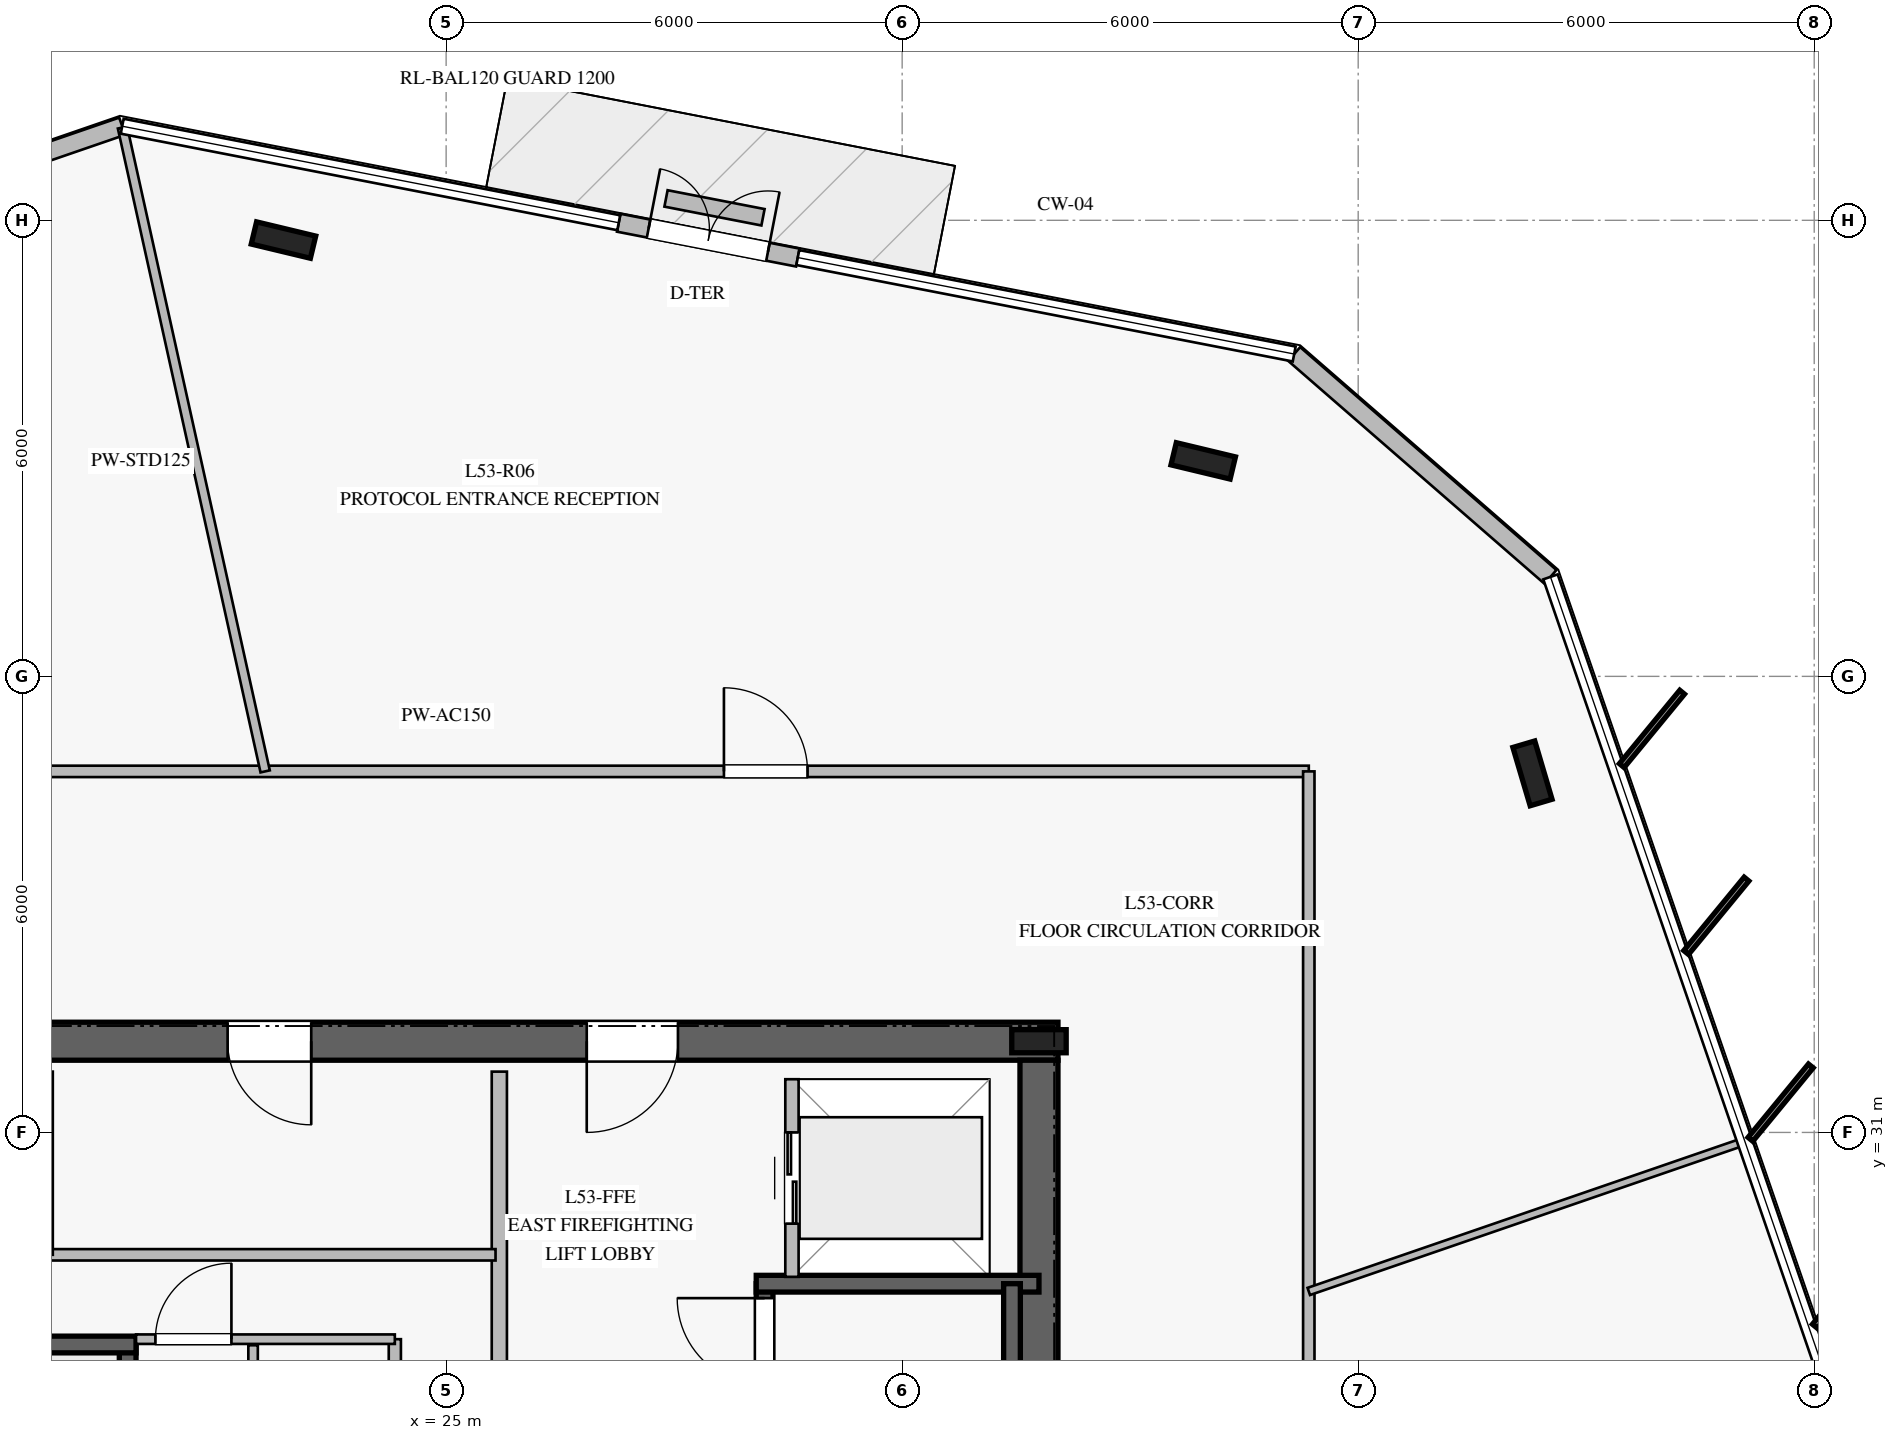
"""IFC4 building model, lengths in metres.
Left out: names, types, materials, properties, quantities, classifications, styles, units other than length and angle.
Written with IfcOpenShell. Run it as: python <this file> out.ifc"""

import sys

from ifc_helpers import new_model, si_unit, direction, frame, frame_2d, origin, origin_2d, place, context, subcontext, project, spatial, rectangle, i_section, extrude, element, fill, save


model = new_model("IFC4")
c1 = context("Model", 3, precision=1e-05, world=origin(), true_north=direction((0.0, 1.0)))
c2 = subcontext(c1, "Body", "Model", "MODEL_VIEW")
j1 = project(units=[si_unit("LENGTHUNIT", "METRE"), si_unit("PLANEANGLEUNIT", "RADIAN")], contexts=[c1])
p1 = place(None, origin())
s1 = spatial("IfcSite", under=j1, at=p1, CompositionType="ELEMENT")
p2 = place(p1, origin())
s2 = spatial("IfcBuilding", under=s1, at=p2, CompositionType="ELEMENT")
p3 = place(p2, frame((0.0, 0.0, 220.8)))
s3 = spatial("IfcBuildingStorey", under=s2, at=p3, CompositionType="ELEMENT", Elevation=220.8)
p4 = place(p3, frame((33.05, 32.2, 0.0), z_axis=(0.0, 0.0, 1.0), x_axis=(-1.0, 0.0, 0.0)))
e1 = element("IfcWall", 1, at=p4, inside=s3, PredefinedType="SHEAR", context=c2, shape_type="SweptSolid", body=[
    extrude(rectangle(XDim=16.1, YDim=0.5, at=frame_2d((8.05, 0.0))), origin(), (0.0, 0.0, 1.0), 3.78),
])
p5 = place(p4, frame((5.0, 0.0, 0.0)))
e2 = element("IfcOpeningElement", 2, at=p5, cuts=e1, PredefinedType="OPENING", context=c2, shape_type="SweptSolid", body=[
    extrude(rectangle(XDim=1.2, YDim=2.25, at=frame_2d((0.6, 1.125))), frame((0.0, 0.26, 0.0), z_axis=(0.0, -1.0, 0.0), x_axis=(1.0, 0.0, 0.0)), (0.0, 0.0, 1.0), 0.52),
])
p6 = place(p4, frame((9.825, 0.0, 0.0)))
e3 = element("IfcOpeningElement", 3, at=p6, cuts=e1, PredefinedType="OPENING", context=c2, shape_type="SweptSolid", body=[
    extrude(rectangle(XDim=1.1, YDim=2.2, at=frame_2d((0.55, 1.1))), frame((0.0, 0.26, 0.0), z_axis=(0.0, -1.0, 0.0), x_axis=(1.0, 0.0, 0.0)), (0.0, 0.0, 1.0), 0.52),
])
p7 = place(p3, frame((32.8, 18.05, 0.0), z_axis=(0.0, 0.0, 1.0), x_axis=(0.0, 1.0, 0.0)))
e4 = element("IfcWall", 4, at=p7, inside=s3, PredefinedType="SHEAR", context=c2, shape_type="SweptSolid", body=[
    extrude(rectangle(XDim=13.9, YDim=0.5, at=frame_2d((6.95, 0.0))), origin(), (0.0, 0.0, 1.0), 3.78),
])
p8 = place(p3, frame((32.8, 32.2, 0.0), z_axis=(0.0, 0.0, 1.0), x_axis=(1.0, 0.0, 0.0)))
e5 = element("IfcColumn", 5, at=p8, inside=s3, PredefinedType="COLUMN", context=c2, shape_type="SweptSolid", body=[
    extrude(i_section(OverallWidth=0.304, OverallDepth=0.716, WebThickness=0.021, FlangeThickness=0.04, at=origin_2d()), origin(), (0.0, 0.0, 1.0), 4.0),
])
p9 = place(p3, frame((20.81, 20.99, 0.0), z_axis=(0.0, 0.0, 1.0), x_axis=(0.0, 1.0, 0.0)))
e6 = element("IfcWall", 6, at=p9, inside=s3, PredefinedType="SOLIDWALL", context=c2, shape_type="SweptSolid", body=[
    extrude(rectangle(XDim=7.22, YDim=0.22, at=frame_2d((3.61, 0.0))), origin(), (0.0, 0.0, 1.0), 3.78),
])
p10 = place(p9, frame((0.18, 0.0, 0.0)))
e7 = element("IfcOpeningElement", 7, at=p10, cuts=e6, PredefinedType="OPENING", context=c2, shape_type="SweptSolid", body=[
    extrude(rectangle(XDim=1.15, YDim=2.2, at=frame_2d((0.575, 1.1))), frame((0.0, 0.12, 0.0), z_axis=(0.0, -1.0, 0.0), x_axis=(1.0, 0.0, 0.0)), (0.0, 0.0, 1.0), 0.24),
])
p11 = place(p3, frame((17.2, 28.21, 0.0), z_axis=(0.0, 0.0, 1.0), x_axis=(1.0, 0.0, 0.0)))
e8 = element("IfcWall", 8, at=p11, inside=s3, PredefinedType="SOLIDWALL", context=c2, shape_type="SweptSolid", body=[
    extrude(rectangle(XDim=3.72, YDim=0.22, at=frame_2d((1.86, 0.0))), origin(), (0.0, 0.0, 1.0), 3.78),
])
p12 = place(p3, frame((29.19, 21.79, 0.0), z_axis=(0.0, 0.0, 1.0), x_axis=(0.0, 1.0, 0.0)))
e9 = element("IfcWall", 9, at=p12, inside=s3, PredefinedType="SOLIDWALL", context=c2, shape_type="SweptSolid", body=[
    extrude(rectangle(XDim=7.22, YDim=0.22, at=frame_2d((3.61, 0.0))), origin(), (0.0, 0.0, 1.0), 3.78),
])
p13 = place(p12, frame((5.88, 0.0, 0.0)))
e10 = element("IfcOpeningElement", 10, at=p13, cuts=e9, PredefinedType="OPENING", context=c2, shape_type="SweptSolid", body=[
    extrude(rectangle(XDim=1.15, YDim=2.2, at=frame_2d((0.575, 1.1))), frame((0.0, 0.12, 0.0), z_axis=(0.0, -1.0, 0.0), x_axis=(1.0, 0.0, 0.0)), (0.0, 0.0, 1.0), 0.24),
])
p14 = place(p3, frame((29.08, 29.01, 0.0), z_axis=(0.0, 0.0, 1.0), x_axis=(1.0, 0.0, 0.0)))
e11 = element("IfcWall", 11, at=p14, inside=s3, PredefinedType="SOLIDWALL", context=c2, shape_type="SweptSolid", body=[
    extrude(rectangle(XDim=3.72, YDim=0.22, at=frame_2d((1.86, 0.0))), origin(), (0.0, 0.0, 1.0), 3.78),
])
p15 = place(p3, frame((32.445, 29.01, 0.0), z_axis=(0.0, 0.0, 1.0), x_axis=(0.0, -1.0, 0.0)))
e12 = element("IfcWall", 12, at=p15, inside=s3, PredefinedType="SOLIDWALL", context=c2, shape_type="SweptSolid", body=[
    extrude(rectangle(XDim=7.22, YDim=0.22, at=frame_2d((3.61, 0.0))), origin(), (0.0, 0.0, 1.0), 3.78),
])
for number, where, z_axis, x_axis in (
    (13, (34.961, 39.835, 0.0), (0.0, 0.0, 1.0), (-0.972, 0.233, 0.0)),
    (14, (22.86, 42.74, 0.0), (0.0, 0.0, 1.0), (-0.972, 0.233, 0.0)),
    (15, (39.293, 35.724, 0.0), (0.0, 0.0, 1.0), (-0.284, 0.959, 0.0)),
):
    element("IfcColumn", number, at=place(p3, frame(where, z_axis=z_axis, x_axis=x_axis)), inside=s3, PredefinedType="COLUMN", context=c2, shape_type="SweptSolid", body=[
        extrude(i_section(OverallWidth=0.3, OverallDepth=0.8, WebThickness=0.018, FlangeThickness=0.033, at=origin_2d()), origin(), (0.0, 0.0, 1.0), 4.0),
    ])
p16 = place(p3, frame((29.627, 42.51, 0.0), z_axis=(0.0, 0.0, 1.0), x_axis=(-0.981622800685, 0.190831541356, 0.0)))
e16 = element("IfcWall", 16, at=p16, inside=s3, PredefinedType="STANDARD", context=c2, shape_type="SweptSolid", body=[
    extrude(rectangle(XDim=2.4, YDim=0.24, at=frame_2d((1.2, 0.0))), origin(), (0.0, 0.0, 1.0), 3.78),
])
p17 = place(p16, frame((0.4, 0.0, 0.0)))
e17 = element("IfcOpeningElement", 17, at=p17, cuts=e16, PredefinedType="OPENING", context=c2, shape_type="SweptSolid", body=[
    extrude(rectangle(XDim=1.6, YDim=2.25, at=frame_2d((0.8, 1.125))), frame((0.0, 0.13, 0.0), z_axis=(0.0, -1.0, 0.0), x_axis=(1.0, 0.0, 0.0)), (0.0, 0.0, 1.0), 0.26),
])
p18 = place(p3, frame((20.738, 44.238, 0.0), z_axis=(0.0, 0.0, 1.0), x_axis=(-0.94554475493, -0.325492114227, 0.0)))
e18 = element("IfcWall", 18, at=p18, inside=s3, PredefinedType="STANDARD", context=c2, shape_type="SweptSolid", body=[
    extrude(rectangle(XDim=4.467, YDim=0.24, at=frame_2d((2.234, 0.0))), origin(), (0.0, 0.0, 1.0), 3.78),
])
p19 = place(p3, frame((39.53, 38.309, 0.0), z_axis=(0.0, 0.0, 1.0), x_axis=(-0.754644337128, 0.656134075049, 0.0)))
e19 = element("IfcWall", 19, at=p19, inside=s3, PredefinedType="STANDARD", context=c2, shape_type="SweptSolid", body=[
    extrude(rectangle(XDim=4.469, YDim=0.24, at=frame_2d((2.234, 0.0))), origin(), (0.0, 0.0, 1.0), 3.78),
])
p20 = place(p3, frame((29.169, 43.04, 0.0), z_axis=(0.0, 0.0, 1.0), x_axis=(-0.981621254658, 0.190839493826, 0.0)))
e20 = element("IfcWall", 20, at=p20, inside=s3, PredefinedType="USERDEFINED", context=c2, shape_type="SweptSolid", body=[
    extrude(rectangle(XDim=1.3, YDim=0.22, at=frame_2d((0.65, 0.0))), origin(), (0.0, 0.0, 1.0), 0.4),
])
p21 = place(p3, frame((25.7, 26.65, 0.0), z_axis=(0.0, 0.0, 1.0), x_axis=(0.0, 1.0, 0.0)))
e21 = element("IfcWall", 21, at=p21, inside=s3, PredefinedType="PARTITIONING", context=c2, shape_type="SweptSolid", body=[
    extrude(rectangle(XDim=5.15, YDim=0.2, at=frame_2d((2.575, 0.0))), origin(), (0.0, 0.0, 1.0), 3.78),
])
p22 = place(p3, frame((24.325, 23.35, 0.0), z_axis=(0.0, 0.0, 1.0), x_axis=(0.0, 1.0, 0.0)))
e22 = element("IfcWall", 22, at=p22, inside=s3, PredefinedType="PLUMBINGWALL", context=c2, shape_type="SweptSolid", body=[
    extrude(rectangle(XDim=4.93, YDim=0.16, at=frame_2d((2.465, 0.0))), origin(), (0.0, 0.0, 1.0), 3.78),
])
p23 = place(p22, frame((0.65, 0.0, 0.0)))
e23 = element("IfcOpeningElement", 23, at=p23, cuts=e22, PredefinedType="OPENING", context=c2, shape_type="SweptSolid", body=[
    extrude(rectangle(XDim=0.95, YDim=2.1, at=frame_2d((0.475, 1.05))), frame((0.0, 0.09, 0.0), z_axis=(0.0, -1.0, 0.0), x_axis=(1.0, 0.0, 0.0)), (0.0, 0.0, 1.0), 0.18),
])
p24 = place(p22, frame((3.11, 0.0, 0.0)))
e24 = element("IfcOpeningElement", 24, at=p24, cuts=e22, PredefinedType="OPENING", context=c2, shape_type="SweptSolid", body=[
    extrude(rectangle(XDim=0.9, YDim=2.1, at=frame_2d((0.45, 1.05))), frame((0.0, 0.09, 0.0), z_axis=(0.0, -1.0, 0.0), x_axis=(1.0, 0.0, 0.0)), (0.0, 0.0, 1.0), 0.18),
])
p25 = place(p3, frame((20.92, 28.28, 0.0), z_axis=(0.0, 0.0, 1.0), x_axis=(1.0, 0.0, 0.0)))
e25 = element("IfcWall", 25, at=p25, inside=s3, PredefinedType="PARTITIONING", context=c2, shape_type="SweptSolid", body=[
    extrude(rectangle(XDim=3.405, YDim=0.125, at=frame_2d((1.703, 0.0))), origin(), (0.0, 0.0, 1.0), 3.78),
])
p26 = place(p25, frame((0.255, 0.0, 0.0)))
e26 = element("IfcOpeningElement", 26, at=p26, cuts=e25, PredefinedType="OPENING", context=c2, shape_type="SweptSolid", body=[
    extrude(rectangle(XDim=1.0, YDim=2.15, at=frame_2d((0.5, 1.075))), frame((0.0, 0.073, 0.0), z_axis=(0.0, -1.0, 0.0), x_axis=(1.0, 0.0, 0.0)), (0.0, 0.0, 1.0), 0.145),
])
p27 = place(p3, frame((22.46, 25.62, 0.0), z_axis=(0.0, 0.0, 1.0), x_axis=(0.0, 1.0, 0.0)))
e27 = element("IfcWall", 27, at=p27, inside=s3, PredefinedType="PARTITIONING", context=c2, shape_type="SweptSolid", body=[
    extrude(rectangle(XDim=2.58, YDim=0.125, at=frame_2d((1.29, 0.0))), origin(), (0.0, 0.0, 1.0), 3.78),
])
p28 = place(p3, frame((19.75, 29.39, 0.0), z_axis=(0.0, 0.0, 1.0), x_axis=(1.0, 0.0, 0.0)))
e28 = element("IfcWall", 28, at=p28, inside=s3, PredefinedType="PARTITIONING", context=c2, shape_type="SweptSolid", body=[
    extrude(rectangle(XDim=5.9, YDim=0.15, at=frame_2d((2.95, 0.0))), origin(), (0.0, 0.0, 1.0), 3.78),
])
p29 = place(p3, frame((19.75, 29.39, 0.0), z_axis=(0.0, 0.0, 1.0), x_axis=(0.0, 1.0, 0.0)))
e29 = element("IfcWall", 29, at=p29, inside=s3, PredefinedType="PARTITIONING", context=c2, shape_type="SweptSolid", body=[
    extrude(rectangle(XDim=2.41, YDim=0.15, at=frame_2d((1.205, 0.0))), origin(), (0.0, 0.0, 1.0), 3.78),
])
p30 = place(p3, frame((29.55, 29.1, 0.0), z_axis=(0.0, 0.0, 1.0), x_axis=(0.0, 1.0, 0.0)))
e30 = element("IfcWall", 30, at=p30, inside=s3, PredefinedType="PARTITIONING", context=c2, shape_type="SweptSolid", body=[
    extrude(rectangle(XDim=2.6, YDim=0.175, at=frame_2d((1.3, 0.0))), origin(), (0.0, 0.0, 1.0), 3.78),
])
p31 = place(p30, frame((0.7, 0.0, 0.0)))
e31 = element("IfcOpeningElement", 31, at=p31, cuts=e30, PredefinedType="OPENING", context=c2, shape_type="SweptSolid", body=[
    extrude(rectangle(XDim=1.2, YDim=2.2, at=frame_2d((0.6, 1.1))), frame((0.0, 0.098, 0.0), z_axis=(0.0, -1.0, 0.0), x_axis=(1.0, 0.0, 0.0)), (0.0, 0.0, 1.0), 0.195),
])
p32 = place(p3, frame((13.65, 35.75, 0.0), z_axis=(0.0, 0.0, 1.0), x_axis=(1.0, 0.0, 0.0)))
e32 = element("IfcWall", 32, at=p32, inside=s3, PredefinedType="PARTITIONING", context=c2, shape_type="SweptSolid", body=[
    extrude(rectangle(XDim=22.7, YDim=0.15, at=frame_2d((11.35, 0.0))), origin(), (0.0, 0.0, 1.0), 3.02),
])
p33 = place(p32, frame((15.005, 0.0, 0.0)))
e33 = element("IfcOpeningElement", 33, at=p33, cuts=e32, PredefinedType="OPENING", context=c2, shape_type="SweptSolid", body=[
    extrude(rectangle(XDim=1.1, YDim=2.2, at=frame_2d((0.55, 1.1))), frame((0.0, 0.085, 0.0), z_axis=(0.0, -1.0, 0.0), x_axis=(1.0, 0.0, 0.0)), (0.0, 0.0, 1.0), 0.17),
])
p34 = place(p32, frame((4.11, 0.0, 0.0)))
e34 = element("IfcOpeningElement", 34, at=p34, cuts=e32, PredefinedType="OPENING", context=c2, shape_type="SweptSolid", body=[
    extrude(rectangle(XDim=1.1, YDim=2.2, at=frame_2d((0.55, 1.1))), frame((0.0, 0.085, 0.0), z_axis=(0.0, -1.0, 0.0), x_axis=(1.0, 0.0, 0.0)), (0.0, 0.0, 1.0), 0.17),
])
p35 = place(p3, frame((36.35, 35.75, 0.0), z_axis=(0.0, 0.0, 1.0), x_axis=(0.0, -1.0, 0.0)))
e35 = element("IfcWall", 35, at=p35, inside=s3, PredefinedType="PARTITIONING", context=c2, shape_type="SweptSolid", body=[
    extrude(rectangle(XDim=21.5, YDim=0.15, at=frame_2d((10.75, 0.0))), origin(), (0.0, 0.0, 1.0), 3.05),
])
p36 = place(p35, frame((19.068, 0.0, 0.0)))
e36 = element("IfcOpeningElement", 36, at=p36, cuts=e35, PredefinedType="OPENING", context=c2, shape_type="SweptSolid", body=[
    extrude(rectangle(XDim=1.1, YDim=2.2, at=frame_2d((0.55, 1.1))), frame((0.0, 0.085, 0.0), z_axis=(0.0, -1.0, 0.0), x_axis=(1.0, 0.0, 0.0)), (0.0, 0.0, 1.0), 0.17),
])
p37 = place(p35, frame((11.999, 0.0, 0.0)))
e37 = element("IfcOpeningElement", 37, at=p37, cuts=e35, PredefinedType="OPENING", context=c2, shape_type="SweptSolid", body=[
    extrude(rectangle(XDim=1.1, YDim=2.2, at=frame_2d((0.55, 1.1))), frame((0.0, 0.085, 0.0), z_axis=(0.0, -1.0, 0.0), x_axis=(1.0, 0.0, 0.0)), (0.0, 0.0, 1.0), 0.17),
])
p38 = place(p3, frame((22.619, 35.75, 0.0), z_axis=(0.0, 0.0, 1.0), x_axis=(-0.2163285843, 0.976320615174, 0.0)))
e38 = element("IfcWall", 38, at=p38, inside=s3, PredefinedType="PARTITIONING", context=c2, shape_type="SweptSolid", body=[
    extrude(rectangle(XDim=8.677, YDim=0.125, at=frame_2d((4.338, 0.0))), origin(), (0.0, 0.0, 1.0), 3.02),
])
p39 = place(p3, frame((36.35, 28.908, 0.0), z_axis=(0.0, 0.0, 1.0), x_axis=(0.945513966892, 0.325581538807, 0.0)))
e39 = element("IfcWall", 39, at=p39, inside=s3, PredefinedType="MOVABLE", context=c2, shape_type="SweptSolid", body=[
    extrude(rectangle(XDim=6.051, YDim=0.1, at=frame_2d((3.025, 0.0))), origin(), (0.0, 0.0, 1.0), 3.05),
])
p40 = place(p17, frame((1.6, 0.0, 0.0), z_axis=(0.0, 0.0, 1.0), x_axis=(-1.0, 0.0, 0.0)))
e40 = element("IfcDoor", 40, at=p40, inside=s3, OperationType="DOUBLE_DOOR_SINGLE_SWING", PredefinedType="DOOR", context=c2, shape_type="SweptSolid", body=[
    extrude(rectangle(XDim=1.6, YDim=2.25, at=frame_2d((0.8, 1.125))), frame((0.0, 0.025, 0.0), z_axis=(0.0, -1.0, 0.0), x_axis=(1.0, 0.0, 0.0)), (0.0, 0.0, 1.0), 0.05),
])
fill(e17, e40)
p41 = place(p13, origin())
e41 = element("IfcDoor", 41, at=p41, inside=s3, OperationType="SINGLE_SWING_RIGHT", PredefinedType="DOOR", context=c2, shape_type="SweptSolid", body=[
    extrude(rectangle(XDim=1.15, YDim=2.2, at=frame_2d((0.575, 1.1))), frame((0.0, 0.025, 0.0), z_axis=(0.0, -1.0, 0.0), x_axis=(1.0, 0.0, 0.0)), (0.0, 0.0, 1.0), 0.05),
])
fill(e10, e41)
p42 = place(p5, origin())
e42 = element("IfcDoor", 42, at=p42, inside=s3, OperationType="SINGLE_SWING_RIGHT", PredefinedType="DOOR", context=c2, shape_type="SweptSolid", body=[
    extrude(rectangle(XDim=1.2, YDim=2.25, at=frame_2d((0.6, 1.125))), frame((0.0, 0.025, 0.0), z_axis=(0.0, -1.0, 0.0), x_axis=(1.0, 0.0, 0.0)), (0.0, 0.0, 1.0), 0.05),
])
fill(e2, e42)
p43 = place(p26, origin())
e43 = element("IfcDoor", 43, at=p43, inside=s3, OperationType="SINGLE_SWING_RIGHT", PredefinedType="DOOR", context=c2, shape_type="SweptSolid", body=[
    extrude(rectangle(XDim=1.0, YDim=2.15, at=frame_2d((0.5, 1.075))), frame((0.0, 0.025, 0.0), z_axis=(0.0, -1.0, 0.0), x_axis=(1.0, 0.0, 0.0)), (0.0, 0.0, 1.0), 0.05),
])
fill(e26, e43)
p44 = place(p6, origin())
e44 = element("IfcDoor", 44, at=p44, inside=s3, OperationType="SINGLE_SWING_LEFT", PredefinedType="DOOR", context=c2, shape_type="SweptSolid", body=[
    extrude(rectangle(XDim=1.1, YDim=2.2, at=frame_2d((0.55, 1.1))), frame((0.0, 0.025, 0.0), z_axis=(0.0, -1.0, 0.0), x_axis=(1.0, 0.0, 0.0)), (0.0, 0.0, 1.0), 0.05),
])
fill(e3, e44)
p45 = place(p31, origin())
e45 = element("IfcDoor", 45, at=p45, inside=s3, OperationType="DOUBLE_DOOR_SLIDING", PredefinedType="DOOR", context=c2, shape_type="SweptSolid", body=[
    extrude(rectangle(XDim=1.2, YDim=2.2, at=frame_2d((0.6, 1.1))), frame((0.0, 0.025, 0.0), z_axis=(0.0, -1.0, 0.0), x_axis=(1.0, 0.0, 0.0)), (0.0, 0.0, 1.0), 0.05),
])
fill(e31, e45)
p46 = place(p33, origin())
e46 = element("IfcDoor", 46, at=p46, inside=s3, OperationType="SINGLE_SWING_LEFT", PredefinedType="DOOR", context=c2, shape_type="SweptSolid", body=[
    extrude(rectangle(XDim=1.1, YDim=2.2, at=frame_2d((0.55, 1.1))), frame((0.0, 0.025, 0.0), z_axis=(0.0, -1.0, 0.0), x_axis=(1.0, 0.0, 0.0)), (0.0, 0.0, 1.0), 0.05),
])
fill(e33, e46)
save(model, sys.argv[1])
